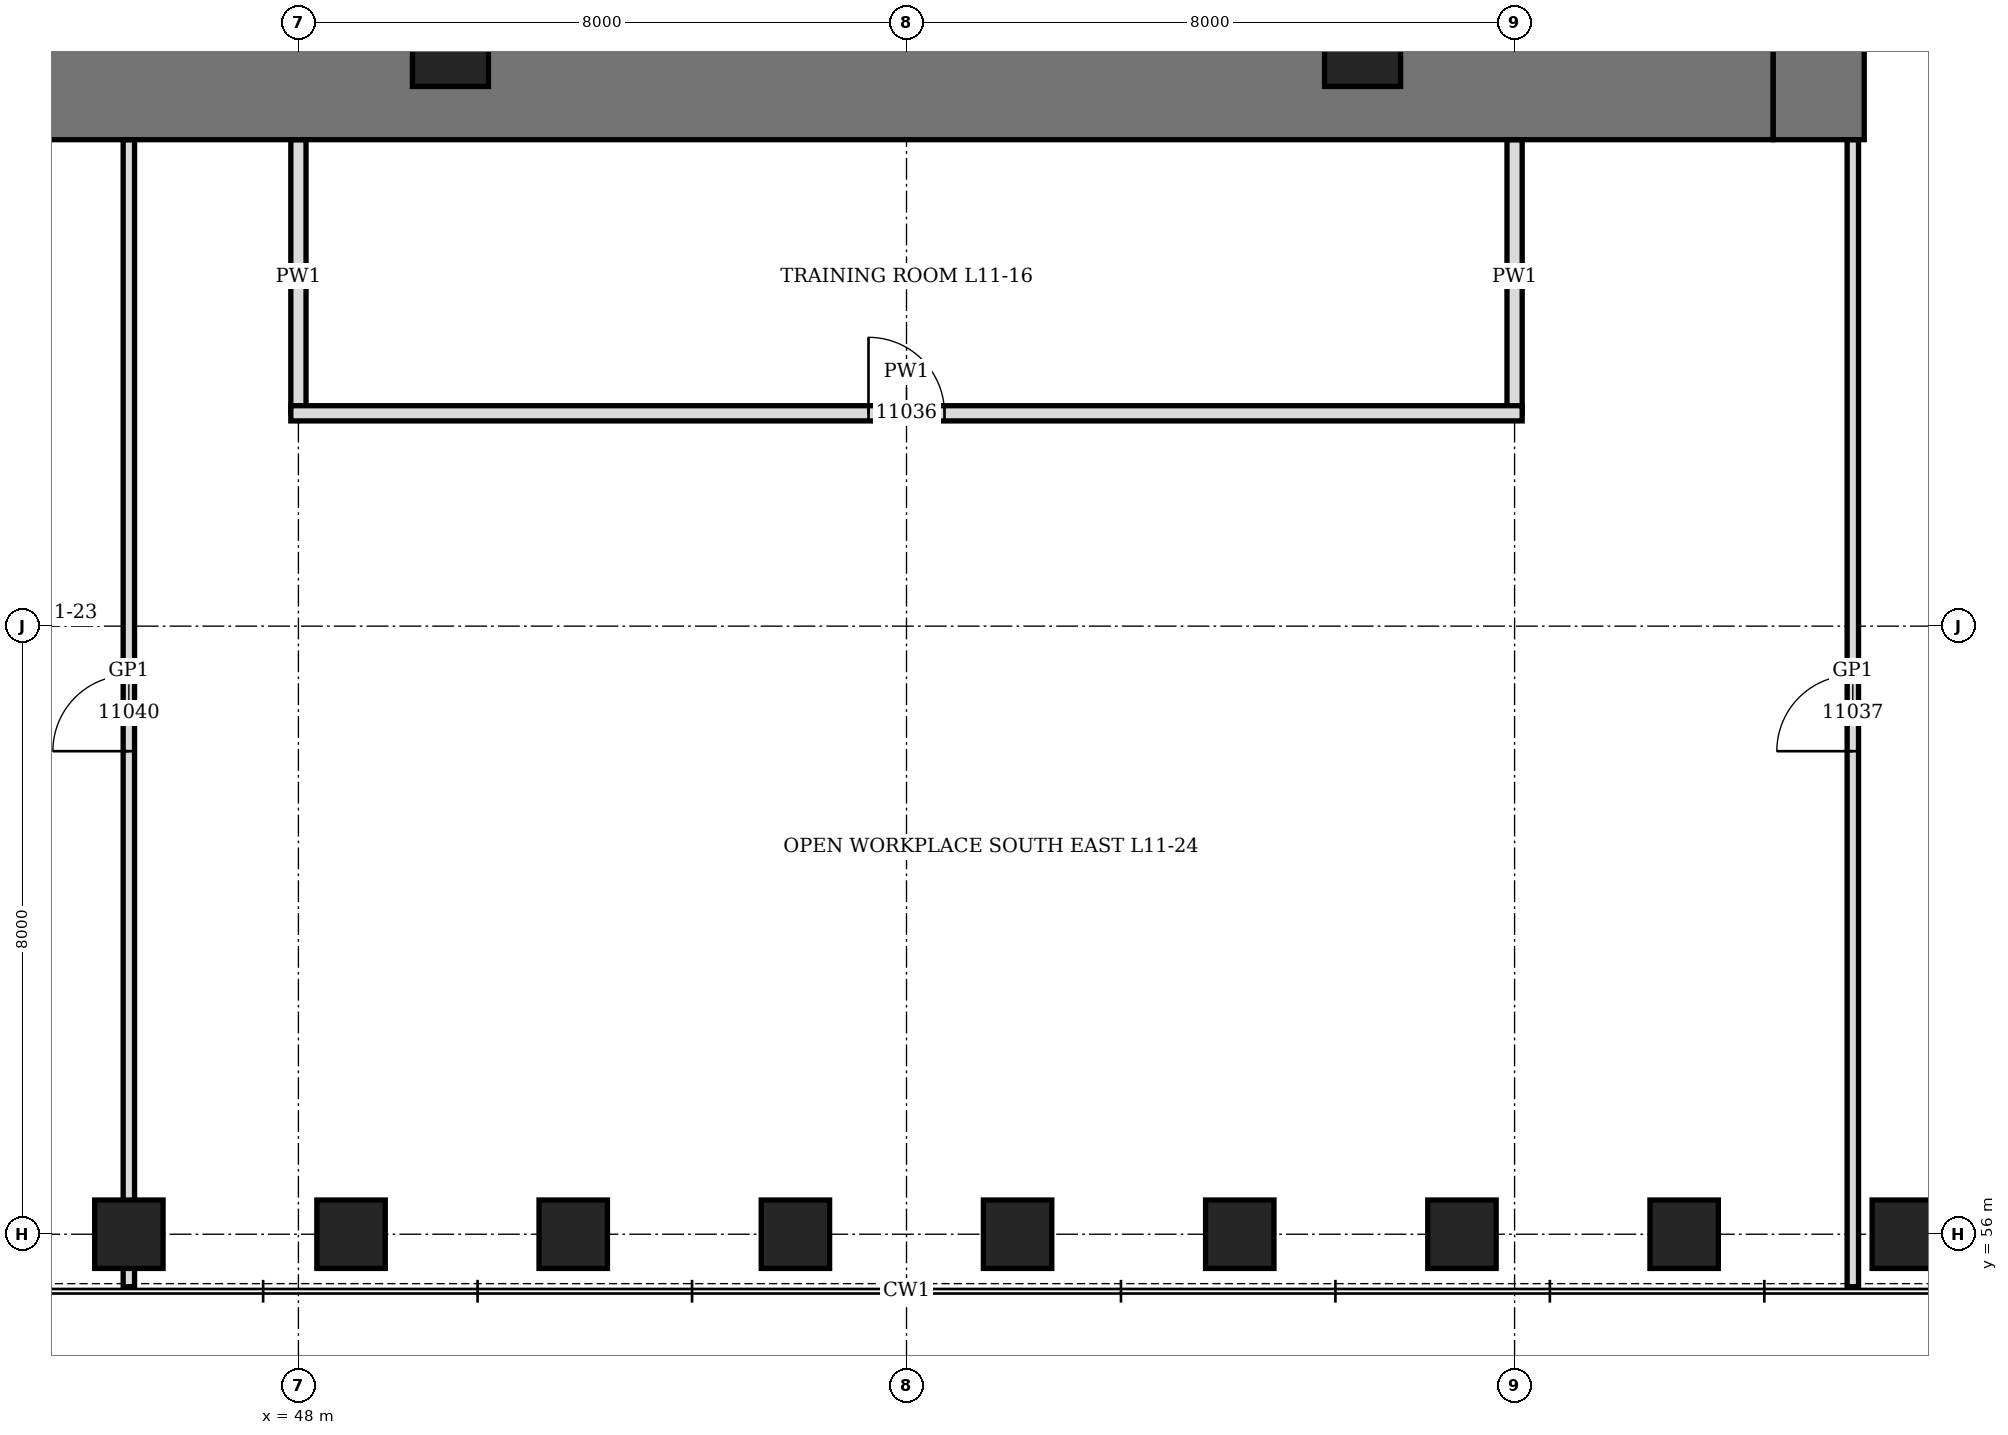
"""IFC4 building model, lengths in metres.
Left out: names, types, materials, properties, quantities, classifications, styles, units other than length and angle.
Written with IfcOpenShell. Run it as: python <this file> out.ifc"""

import sys

from ifc_helpers import new_model, si_unit, direction, frame, frame_2d, origin, origin_2d, place, context, subcontext, project, spatial, rectangle, hollow_rectangle, extrude, element, fill, save


model = new_model("IFC4")
c1 = context("Model", 3, precision=1e-05, world=origin(), true_north=direction((0.0, 1.0)))
c2 = subcontext(c1, "Body", "Model", "MODEL_VIEW")
j1 = project(units=[si_unit("LENGTHUNIT", "METRE"), si_unit("PLANEANGLEUNIT", "RADIAN")], contexts=[c1])
p1 = place(None, origin())
s1 = spatial("IfcSite", under=j1, at=p1, CompositionType="ELEMENT")
p2 = place(p1, origin())
s2 = spatial("IfcBuilding", under=s1, at=p2, CompositionType="ELEMENT")
p3 = place(p2, frame((0.0, 0.0, 55.9)))
s3 = spatial("IfcBuildingStorey", under=s2, at=p3, CompositionType="ELEMENT", Elevation=55.9)
for number, where, z_axis, x_axis in (
    (1, (45.769, 56.0, 0.0), (0.0, 0.0, 1.0), (1.0, 0.0, 0.0)),
    (2, (48.692, 56.0, 0.0), (0.0, 0.0, 1.0), (1.0, 0.0, 0.0)),
    (3, (51.615, 56.0, 0.0), (0.0, 0.0, 1.0), (1.0, 0.0, 0.0)),
    (4, (54.539, 56.0, 0.0), (0.0, 0.0, 1.0), (1.0, 0.0, 0.0)),
    (5, (57.461, 56.0, 0.0), (0.0, 0.0, 1.0), (1.0, 0.0, 0.0)),
    (6, (60.385, 56.0, 0.0), (0.0, 0.0, 1.0), (1.0, 0.0, 0.0)),
    (7, (63.308, 56.0, 0.0), (0.0, 0.0, 1.0), (1.0, 0.0, 0.0)),
    (8, (66.231, 56.0, 0.0), (0.0, 0.0, 1.0), (1.0, 0.0, 0.0)),
    (9, (69.154, 56.0, 0.0), (0.0, 0.0, 1.0), (1.0, 0.0, 0.0)),
):
    element("IfcColumn", number, at=place(p3, frame(where, z_axis=z_axis, x_axis=x_axis)), inside=s3, PredefinedType="COLUMN", context=c2, shape_type="SweptSolid", body=[
        extrude(hollow_rectangle(XDim=0.9, YDim=0.9, WallThickness=0.12, at=origin_2d()), origin(), (0.0, 0.0, 1.0), 4.2),
    ])
p4 = place(p3, frame((68.0, 70.4, 0.0), z_axis=(0.0, 0.0, 1.0), x_axis=(0.0, 1.0, 0.0)))
e10 = element("IfcWall", 10, at=p4, inside=s3, PredefinedType="SHEAR", context=c2, shape_type="SweptSolid", body=[
    extrude(rectangle(XDim=19.2, YDim=1.2, at=frame_2d((9.6, 0.0))), origin(), (0.0, 0.0, 1.0), 4.2),
])
p5 = place(p4, frame((8.6, 0.0, 0.0)))
e11 = element("IfcOpeningElement", 11, at=p5, cuts=e10, PredefinedType="OPENING", context=c2, shape_type="SweptSolid", body=[
    extrude(rectangle(XDim=2.0, YDim=2.4, at=frame_2d((1.0, 1.2))), frame((0.0, 0.61, 0.0), z_axis=(0.0, -1.0, 0.0), x_axis=(1.0, 0.0, 0.0)), (0.0, 0.0, 1.0), 1.22),
])
p6 = place(p3, frame((44.6, 71.0, 0.0), z_axis=(0.0, 0.0, 1.0), x_axis=(1.0, 0.0, 0.0)))
e12 = element("IfcWall", 12, at=p6, inside=s3, PredefinedType="SHEAR", context=c2, shape_type="SweptSolid", body=[
    extrude(rectangle(XDim=22.8, YDim=1.2, at=frame_2d((11.4, 0.0))), origin(), (0.0, 0.0, 1.0), 4.2),
])
for number, where, z_axis, x_axis in (
    (13, (50.0, 71.6, 0.0), (0.0, 0.0, 1.0), (1.0, 0.0, 0.0)),
    (14, (62.0, 71.6, 0.0), (0.0, 0.0, 1.0), (1.0, 0.0, 0.0)),
):
    element("IfcColumn", number, at=place(p3, frame(where, z_axis=z_axis, x_axis=x_axis)), inside=s3, PredefinedType="COLUMN", context=c2, shape_type="SweptSolid", body=[
        extrude(hollow_rectangle(XDim=1.0, YDim=1.0, WallThickness=0.15, at=origin_2d()), origin(), (0.0, 0.0, 1.0), 4.2),
    ])
for number, where, z_axis, x_axis in (
    (15, (48.0, 66.8, 0.0), (0.0, 0.0, 1.0), (0.0, 1.0, 0.0)),
    (16, (64.0, 66.8, 0.0), (0.0, 0.0, 1.0), (0.0, 1.0, 0.0)),
):
    element("IfcWall", number, at=place(p3, frame(where, z_axis=z_axis, x_axis=x_axis)), inside=s3, PredefinedType="PARTITIONING", context=c2, shape_type="SweptSolid", body=[
        extrude(rectangle(XDim=3.6, YDim=0.2, at=frame_2d((1.8, 0.0))), origin(), (0.0, 0.0, 1.0), 4.04),
    ])
p7 = place(p3, frame((47.9, 66.8, 0.0), z_axis=(0.0, 0.0, 1.0), x_axis=(1.0, 0.0, 0.0)))
e17 = element("IfcWall", 17, at=p7, inside=s3, PredefinedType="PARTITIONING", context=c2, shape_type="SweptSolid", body=[
    extrude(rectangle(XDim=16.2, YDim=0.2, at=frame_2d((8.1, 0.0))), origin(), (0.0, 0.0, 1.0), 4.04),
])
p8 = place(p7, frame((7.6, 0.0, 0.0)))
e18 = element("IfcOpeningElement", 18, at=p8, cuts=e17, PredefinedType="OPENING", context=c2, shape_type="SweptSolid", body=[
    extrude(rectangle(XDim=1.0, YDim=2.1, at=frame_2d((0.5, 1.05))), frame((0.0, 0.11, 0.0), z_axis=(0.0, -1.0, 0.0), x_axis=(1.0, 0.0, 0.0)), (0.0, 0.0, 1.0), 0.22),
])
p9 = place(p3, frame((45.769, 55.31, 0.0), z_axis=(0.0, 0.0, 1.0), x_axis=(0.0, 1.0, 0.0)))
e19 = element("IfcWall", 19, at=p9, inside=s3, PredefinedType="PARTITIONING", context=c2, shape_type="SweptSolid", body=[
    extrude(rectangle(XDim=15.09, YDim=0.15, at=frame_2d((7.545, 0.0))), origin(), (0.0, 0.0, 1.0), 3.278),
])
p10 = place(p9, frame((7.045, 0.0, 0.0)))
e20 = element("IfcOpeningElement", 20, at=p10, cuts=e19, PredefinedType="OPENING", context=c2, shape_type="SweptSolid", body=[
    extrude(rectangle(XDim=1.0, YDim=2.4, at=frame_2d((0.5, 1.2))), frame((0.0, 0.085, 0.0), z_axis=(0.0, -1.0, 0.0), x_axis=(1.0, 0.0, 0.0)), (0.0, 0.0, 1.0), 0.17),
])
p11 = place(p3, frame((68.45, 55.31, 0.0), z_axis=(0.0, 0.0, 1.0), x_axis=(0.0, 1.0, 0.0)))
e21 = element("IfcWall", 21, at=p11, inside=s3, PredefinedType="PARTITIONING", context=c2, shape_type="SweptSolid", body=[
    extrude(rectangle(XDim=15.09, YDim=0.15, at=frame_2d((7.545, 0.0))), origin(), (0.0, 0.0, 1.0), 4.04),
])
p12 = place(p11, frame((7.045, 0.0, 0.0)))
e22 = element("IfcOpeningElement", 22, at=p12, cuts=e21, PredefinedType="OPENING", context=c2, shape_type="SweptSolid", body=[
    extrude(rectangle(XDim=1.0, YDim=2.4, at=frame_2d((0.5, 1.2))), frame((0.0, 0.085, 0.0), z_axis=(0.0, -1.0, 0.0), x_axis=(1.0, 0.0, 0.0)), (0.0, 0.0, 1.0), 0.17),
])
p13 = place(p8, origin())
e23 = element("IfcDoor", 23, at=p13, inside=s3, OperationType="SINGLE_SWING_LEFT", PredefinedType="DOOR", context=c2, shape_type="SweptSolid", body=[
    extrude(rectangle(XDim=1.0, YDim=2.1, at=frame_2d((0.5, 1.05))), frame((0.0, 0.1, 0.0), z_axis=(0.0, -1.0, 0.0), x_axis=(1.0, 0.0, 0.0)), (0.0, 0.0, 1.0), 0.199),
])
fill(e18, e23)
p14 = place(p12, origin())
e24 = element("IfcDoor", 24, at=p14, inside=s3, OperationType="SINGLE_SWING_RIGHT", PredefinedType="DOOR", context=c2, shape_type="SweptSolid", body=[
    extrude(rectangle(XDim=1.0, YDim=2.4, at=frame_2d((0.5, 1.2))), frame((0.0, 0.075, 0.0), z_axis=(0.0, -1.0, 0.0), x_axis=(1.0, 0.0, 0.0)), (0.0, 0.0, 1.0), 0.149),
])
fill(e22, e24)
p15 = place(p10, origin())
e25 = element("IfcDoor", 25, at=p15, inside=s3, OperationType="SINGLE_SWING_RIGHT", PredefinedType="DOOR", context=c2, shape_type="SweptSolid", body=[
    extrude(rectangle(XDim=1.0, YDim=2.4, at=frame_2d((0.5, 1.2))), frame((0.0, 0.075, 0.0), z_axis=(0.0, -1.0, 0.0), x_axis=(1.0, 0.0, 0.0)), (0.0, 0.0, 1.0), 0.149),
])
fill(e20, e25)
save(model, sys.argv[1])
